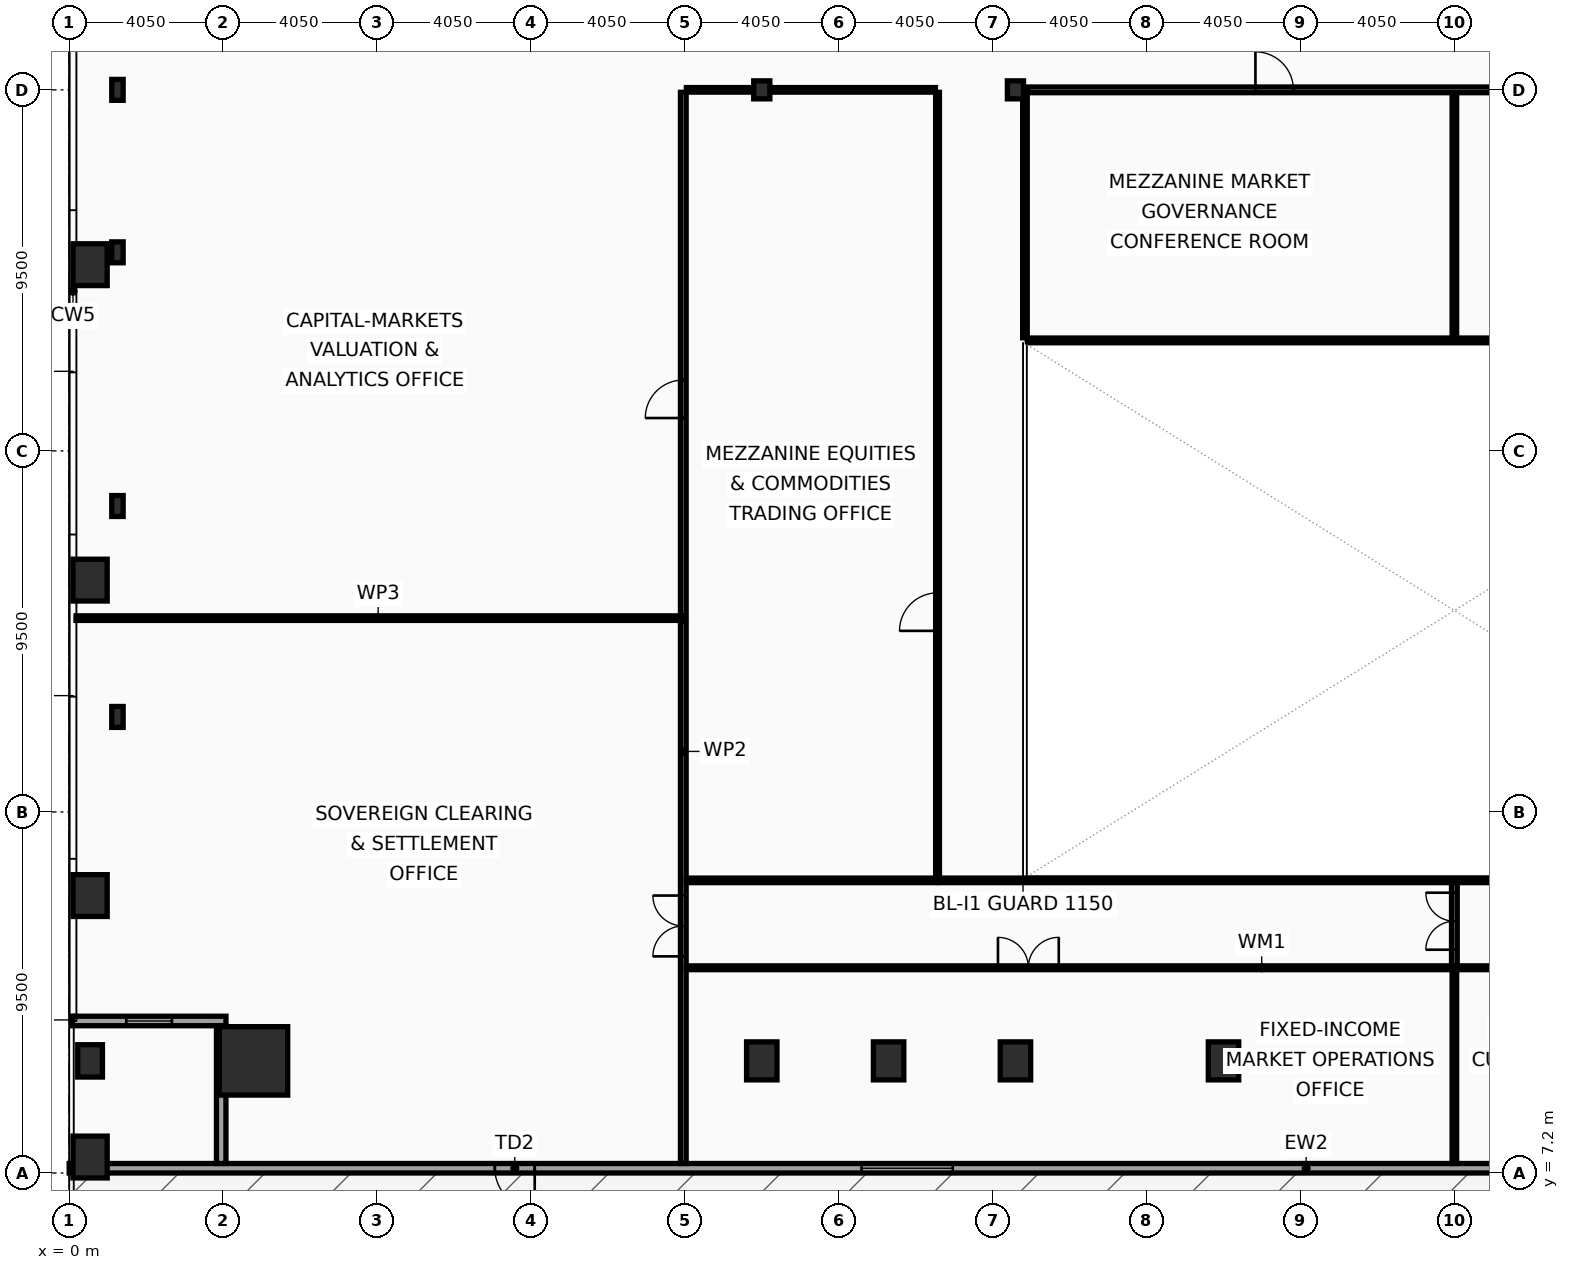
"""IFC4 building model, lengths in metres.
Left out: names, types, materials, properties, quantities, classifications, styles, units other than length and angle.
Written with IfcOpenShell. Run it as: python <this file> out.ifc"""

import sys

from ifc_helpers import new_model, si_unit, direction, frame, frame_2d, origin, origin_2d, place, context, subcontext, project, spatial, rectangle, hollow_rectangle, i_section, extrude, element, fill, save


model = new_model("IFC4")
c1 = context("Model", 3, precision=1e-05, world=origin(), true_north=direction((0.0, 1.0)))
c2 = subcontext(c1, "Body", "Model", "MODEL_VIEW")
j1 = project(units=[si_unit("LENGTHUNIT", "METRE"), si_unit("PLANEANGLEUNIT", "RADIAN")], contexts=[c1])
p1 = place(None, origin())
s1 = spatial("IfcSite", under=j1, at=p1, CompositionType="ELEMENT")
p2 = place(p1, origin())
s2 = spatial("IfcBuilding", under=s1, at=p2, CompositionType="ELEMENT")
p3 = place(p2, frame((0.0, 0.0, 5.4)))
s3 = spatial("IfcBuildingStorey", under=s2, at=p3, CompositionType="ELEMENT", Elevation=5.4)
p4 = place(p3, frame((4.85, 10.15, 0.0), z_axis=(0.0, 0.0, 1.0), x_axis=(1.0, 0.0, 0.0)))
e1 = element("IfcColumn", 1, at=p4, inside=s3, PredefinedType="COLUMN", context=c2, shape_type="SweptSolid", body=[
    extrude(hollow_rectangle(XDim=1.8, YDim=1.8, WallThickness=0.08, at=origin_2d()), origin(), (0.0, 0.0, 1.0), 5.0),
])
for number, where, z_axis, x_axis in (
    (2, (18.225, 10.15, 0.0), (0.0, 0.0, 1.0), (1.0, 0.0, 0.0)),
    (3, (21.562, 10.15, 0.0), (0.0, 0.0, 1.0), (1.0, 0.0, 0.0)),
    (4, (24.9, 10.15, 0.0), (0.0, 0.0, 1.0), (1.0, 0.0, 0.0)),
    (5, (30.375, 10.15, 0.0), (0.0, 0.0, 1.0), (1.0, 0.0, 0.0)),
):
    element("IfcColumn", number, at=place(p3, frame(where, z_axis=z_axis, x_axis=x_axis)), inside=s3, PredefinedType="COLUMN", context=c2, shape_type="SweptSolid", body=[
        extrude(hollow_rectangle(XDim=0.8, YDim=1.0, WallThickness=0.055, at=origin_2d()), origin(), (0.0, 0.0, 1.0), 5.0),
    ])
for number, where, z_axis, x_axis in (
    (6, (1.27, 19.2, 0.0), (0.0, 0.0, 1.0), (1.0, 0.0, 0.0)),
    (7, (1.27, 24.75, 0.0), (0.0, 0.0, 1.0), (1.0, 0.0, 0.0)),
    (8, (1.27, 31.425, 0.0), (0.0, 0.0, 1.0), (1.0, 0.0, 0.0)),
    (9, (1.27, 35.7, 0.0), (0.0, 0.0, 1.0), (1.0, 0.0, 0.0)),
):
    element("IfcColumn", number, at=place(p3, frame(where, z_axis=z_axis, x_axis=x_axis)), inside=s3, PredefinedType="COLUMN", context=c2, shape_type="SweptSolid", body=[
        extrude(i_section(OverallWidth=0.3, OverallDepth=0.55, WebThickness=0.015, FlangeThickness=0.029, at=origin_2d()), origin(), (0.0, 0.0, 1.0), 5.0),
    ])
for number, where, z_axis, x_axis in (
    (10, (18.225, 35.7, 0.0), (0.0, 0.0, 1.0), (1.0, 0.0, 0.0)),
    (11, (24.9, 35.7, 0.0), (0.0, 0.0, 1.0), (1.0, 0.0, 0.0)),
):
    element("IfcColumn", number, at=place(p3, frame(where, z_axis=z_axis, x_axis=x_axis)), inside=s3, PredefinedType="COLUMN", context=c2, shape_type="SweptSolid", body=[
        extrude(i_section(OverallWidth=0.424, OverallDepth=0.474, WebThickness=0.048, FlangeThickness=0.077, at=origin_2d()), origin(), (0.0, 0.0, 1.0), 5.0),
    ])
p5 = place(p3, frame((0.55, 7.62, 0.0), z_axis=(0.0, 0.0, 1.0), x_axis=(1.0, 0.0, 0.0)))
e12 = element("IfcColumn", 12, at=p5, inside=s3, PredefinedType="PILASTER", context=c2, shape_type="SweptSolid", body=[
    extrude(rectangle(XDim=0.9, YDim=1.1, at=origin_2d()), origin(), (0.0, 0.0, 1.0), 5.0),
])
p6 = place(p3, frame((0.55, 10.15, 0.0), z_axis=(0.0, 0.0, 1.0), x_axis=(1.0, 0.0, 0.0)))
e13 = element("IfcColumn", 13, at=p6, inside=s3, PredefinedType="PILASTER", context=c2, shape_type="SweptSolid", body=[
    extrude(rectangle(XDim=0.65, YDim=0.85, at=origin_2d()), origin(), (0.0, 0.0, 1.0), 5.0),
])
for number, where, z_axis, x_axis in (
    (14, (0.55, 14.5, 0.0), (0.0, 0.0, 1.0), (1.0, 0.0, 0.0)),
    (15, (0.55, 22.8, 0.0), (0.0, 0.0, 1.0), (1.0, 0.0, 0.0)),
    (16, (0.55, 31.1, 0.0), (0.0, 0.0, 1.0), (1.0, 0.0, 0.0)),
):
    element("IfcColumn", number, at=place(p3, frame(where, z_axis=z_axis, x_axis=x_axis)), inside=s3, PredefinedType="PILASTER", context=c2, shape_type="SweptSolid", body=[
        extrude(rectangle(XDim=0.9, YDim=1.1, at=origin_2d()), origin(), (0.0, 0.0, 1.0), 5.0),
    ])
p7 = place(p3, frame((72.9, 7.325, 0.0), z_axis=(0.0, 0.0, 1.0), x_axis=(-1.0, 0.0, 0.0)))
e17 = element("IfcWall", 17, at=p7, inside=s3, PredefinedType="SOLIDWALL", context=c2, shape_type="SweptSolid", body=[
    extrude(rectangle(XDim=72.9, YDim=0.25, at=frame_2d((36.45, 0.0))), origin(), (0.0, 0.0, 1.0), 3.89),
])
p8 = place(p7, frame((10.45, 0.0, 0.0)))
e18 = element("IfcOpeningElement", 18, at=p8, cuts=e17, PredefinedType="OPENING", context=c2, shape_type="SweptSolid", body=[
    extrude(rectangle(XDim=1.6, YDim=2.2, at=frame_2d((0.8, 1.1))), frame((0.0, 0.135, 0.0), z_axis=(0.0, -1.0, 0.0), x_axis=(1.0, 0.0, 0.0)), (0.0, 0.0, 1.0), 0.27),
])
p9 = place(p7, frame((29.45, 0.0, 0.0)))
e19 = element("IfcOpeningElement", 19, at=p9, cuts=e17, PredefinedType="OPENING", context=c2, shape_type="SweptSolid", body=[
    extrude(rectangle(XDim=1.6, YDim=2.2, at=frame_2d((0.8, 1.1))), frame((0.0, 0.135, 0.0), z_axis=(0.0, -1.0, 0.0), x_axis=(1.0, 0.0, 0.0)), (0.0, 0.0, 1.0), 0.27),
])
p10 = place(p7, frame((60.65, 0.0, 0.0)))
e20 = element("IfcOpeningElement", 20, at=p10, cuts=e17, PredefinedType="OPENING", context=c2, shape_type="SweptSolid", body=[
    extrude(rectangle(XDim=1.05, YDim=2.15, at=frame_2d((0.525, 1.075))), frame((0.0, 0.135, 0.0), z_axis=(0.0, -1.0, 0.0), x_axis=(1.0, 0.0, 0.0)), (0.0, 0.0, 1.0), 0.27),
])
p11 = place(p7, frame((21.05, 0.0, 0.85)))
e21 = element("IfcOpeningElement", 21, at=p11, cuts=e17, PredefinedType="OPENING", context=c2, shape_type="SweptSolid", body=[
    extrude(rectangle(XDim=2.4, YDim=2.6, at=frame_2d((1.2, 1.3))), frame((0.0, 0.135, 0.0), z_axis=(0.0, -1.0, 0.0), x_axis=(1.0, 0.0, 0.0)), (0.0, 0.0, 1.0), 0.27),
])
p12 = place(p7, frame((49.65, 0.0, 0.85)))
e22 = element("IfcOpeningElement", 22, at=p12, cuts=e17, PredefinedType="OPENING", context=c2, shape_type="SweptSolid", body=[
    extrude(rectangle(XDim=2.4, YDim=2.6, at=frame_2d((1.2, 1.3))), frame((0.0, 0.135, 0.0), z_axis=(0.0, -1.0, 0.0), x_axis=(1.0, 0.0, 0.0)), (0.0, 0.0, 1.0), 0.27),
])
p13 = place(p3, frame((4.125, 11.2, 0.0), z_axis=(0.0, 0.0, 1.0), x_axis=(-1.0, 0.0, 0.0)))
e23 = element("IfcWall", 23, at=p13, inside=s3, PredefinedType="SOLIDWALL", context=c2, shape_type="SweptSolid", body=[
    extrude(rectangle(XDim=4.045, YDim=0.25, at=frame_2d((2.022, 0.0))), origin(), (0.0, 0.0, 1.0), 4.14),
])
p14 = place(p13, frame((1.423, 0.0, 0.9)))
e24 = element("IfcOpeningElement", 24, at=p14, cuts=e23, PredefinedType="OPENING", context=c2, shape_type="SweptSolid", body=[
    extrude(rectangle(XDim=1.2, YDim=2.8, at=frame_2d((0.6, 1.4))), frame((0.0, 0.135, 0.0), z_axis=(0.0, -1.0, 0.0), x_axis=(1.0, 0.0, 0.0)), (0.0, 0.0, 1.0), 0.27),
])
p15 = place(p3, frame((4.0, 7.45, 0.0), z_axis=(0.0, 0.0, 1.0), x_axis=(0.0, 1.0, 0.0)))
e25 = element("IfcWall", 25, at=p15, inside=s3, PredefinedType="SOLIDWALL", context=c2, shape_type="SweptSolid", body=[
    extrude(rectangle(XDim=3.625, YDim=0.25, at=frame_2d((1.812, 0.0))), origin(), (0.0, 0.0, 1.0), 4.14),
])
p16 = place(p3, frame((16.16, 7.45, 0.0), z_axis=(0.0, 0.0, 1.0), x_axis=(0.0, 1.0, 0.0)))
e26 = element("IfcWall", 26, at=p16, inside=s3, PredefinedType="PARTITIONING", context=c2, shape_type="SweptSolid", body=[
    extrude(rectangle(XDim=14.285, YDim=0.15, at=frame_2d((7.143, 0.0))), origin(), (0.0, 0.0, 1.0), 3.89),
])
p17 = place(p16, frame((5.45, 0.0, 0.0)))
e27 = element("IfcOpeningElement", 27, at=p17, cuts=e26, PredefinedType="OPENING", context=c2, shape_type="SweptSolid", body=[
    extrude(rectangle(XDim=1.6, YDim=2.15, at=frame_2d((0.8, 1.075))), frame((0.0, 0.085, 0.0), z_axis=(0.0, -1.0, 0.0), x_axis=(1.0, 0.0, 0.0)), (0.0, 0.0, 1.0), 0.17),
])
p18 = place(p3, frame((16.16, 21.865, 0.0), z_axis=(0.0, 0.0, 1.0), x_axis=(0.0, 1.0, 0.0)))
e28 = element("IfcWall", 28, at=p18, inside=s3, PredefinedType="PARTITIONING", context=c2, shape_type="SweptSolid", body=[
    extrude(rectangle(XDim=13.77, YDim=0.15, at=frame_2d((6.885, 0.0))), origin(), (0.0, 0.0, 1.0), 3.89),
])
p19 = place(p18, frame((5.2, 0.0, 0.0)))
e29 = element("IfcOpeningElement", 29, at=p19, cuts=e28, PredefinedType="OPENING", context=c2, shape_type="SweptSolid", body=[
    extrude(rectangle(XDim=1.0, YDim=2.05, at=frame_2d((0.5, 1.025))), frame((0.0, 0.085, 0.0), z_axis=(0.0, -1.0, 0.0), x_axis=(1.0, 0.0, 0.0)), (0.0, 0.0, 1.0), 0.17),
])
p20 = place(p3, frame((0.18, 21.8, 0.0), z_axis=(0.0, 0.0, 1.0), x_axis=(1.0, 0.0, 0.0)))
e30 = element("IfcWall", 30, at=p20, inside=s3, PredefinedType="PARTITIONING", context=c2, shape_type="SweptSolid", body=[
    extrude(rectangle(XDim=15.9, YDim=0.12, at=frame_2d((7.95, 0.0))), origin(), (0.0, 0.0, 1.0), 4.14),
])
p21 = place(p3, frame((16.24, 12.6, 0.0), z_axis=(0.0, 0.0, 1.0), x_axis=(1.0, 0.0, 0.0)))
e31 = element("IfcWall", 31, at=p21, inside=s3, PredefinedType="MOVABLE", context=c2, shape_type="SweptSolid", body=[
    extrude(rectangle(XDim=20.13, YDim=0.1, at=frame_2d((10.065, 0.0))), origin(), (0.0, 0.0, 1.0), 3.89),
])
p22 = place(p21, frame((8.2, 0.0, 0.0)))
e32 = element("IfcOpeningElement", 32, at=p22, cuts=e31, PredefinedType="OPENING", context=c2, shape_type="SweptSolid", body=[
    extrude(rectangle(XDim=1.6, YDim=2.15, at=frame_2d((0.8, 1.075))), frame((0.0, 0.06, 0.0), z_axis=(0.0, -1.0, 0.0), x_axis=(1.0, 0.0, 0.0)), (0.0, 0.0, 1.0), 0.12),
])
p23 = place(p3, frame((36.53, 12.6, 0.0), z_axis=(0.0, 0.0, 1.0), x_axis=(1.0, 0.0, 0.0)))
e33 = element("IfcWall", 33, at=p23, inside=s3, PredefinedType="MOVABLE", context=c2, shape_type="SweptSolid", body=[
    extrude(rectangle(XDim=20.13, YDim=0.1, at=frame_2d((10.065, 0.0))), origin(), (0.0, 0.0, 1.0), 3.89),
])
p24 = place(p23, frame((8.2, 0.0, 0.0)))
e34 = element("IfcOpeningElement", 34, at=p24, cuts=e33, PredefinedType="OPENING", context=c2, shape_type="SweptSolid", body=[
    extrude(rectangle(XDim=1.6, YDim=2.15, at=frame_2d((0.8, 1.075))), frame((0.0, 0.06, 0.0), z_axis=(0.0, -1.0, 0.0), x_axis=(1.0, 0.0, 0.0)), (0.0, 0.0, 1.0), 0.12),
])
p25 = place(p3, frame((36.45, 7.45, 0.0), z_axis=(0.0, 0.0, 1.0), x_axis=(0.0, 1.0, 0.0)))
e35 = element("IfcWall", 35, at=p25, inside=s3, PredefinedType="PARTITIONING", context=c2, shape_type="SweptSolid", body=[
    extrude(rectangle(XDim=5.095, YDim=0.12, at=frame_2d((2.547, 0.0))), origin(), (0.0, 0.0, 1.0), 4.14),
])
p26 = place(p3, frame((25.215, 29.12, 0.0), z_axis=(0.0, 0.0, 1.0), x_axis=(1.0, 0.0, 0.0)))
e36 = element("IfcWall", 36, at=p26, inside=s3, PredefinedType="MOVABLE", context=c2, shape_type="SweptSolid", body=[
    extrude(rectangle(XDim=22.47, YDim=0.1, at=frame_2d((11.235, 0.0))), origin(), (0.0, 0.0, 1.0), 3.89),
])
p27 = place(p3, frame((36.45, 29.175, 0.0), z_axis=(0.0, 0.0, 1.0), x_axis=(0.0, 1.0, 0.0)))
e37 = element("IfcWall", 37, at=p27, inside=s3, PredefinedType="PARTITIONING", context=c2, shape_type="SweptSolid", body=[
    extrude(rectangle(XDim=6.445, YDim=0.12, at=frame_2d((3.223, 0.0))), origin(), (0.0, 0.0, 1.0), 3.89),
])
p28 = place(p3, frame((25.215, 35.7, 0.0), z_axis=(0.0, 0.0, 1.0), x_axis=(1.0, 0.0, 0.0)))
e38 = element("IfcWall", 38, at=p28, inside=s3, PredefinedType="PARTITIONING", context=c2, shape_type="SweptSolid", body=[
    extrude(rectangle(XDim=22.47, YDim=0.15, at=frame_2d((11.235, 0.0))), origin(), (0.0, 0.0, 1.0), 3.89),
])
p29 = place(p28, frame((6.0, 0.0, 0.0)))
e39 = element("IfcOpeningElement", 39, at=p29, cuts=e38, PredefinedType="OPENING", context=c2, shape_type="SweptSolid", body=[
    extrude(rectangle(XDim=1.0, YDim=2.05, at=frame_2d((0.5, 1.025))), frame((0.0, 0.085, 0.0), z_axis=(0.0, -1.0, 0.0), x_axis=(1.0, 0.0, 0.0)), (0.0, 0.0, 1.0), 0.17),
])
p30 = place(p28, frame((18.5, 0.0, 0.0)))
e40 = element("IfcOpeningElement", 40, at=p30, cuts=e38, PredefinedType="OPENING", context=c2, shape_type="SweptSolid", body=[
    extrude(rectangle(XDim=1.0, YDim=2.05, at=frame_2d((0.5, 1.025))), frame((0.0, 0.085, 0.0), z_axis=(0.0, -1.0, 0.0), x_axis=(1.0, 0.0, 0.0)), (0.0, 0.0, 1.0), 0.17),
])
p31 = place(p3, frame((25.15, 29.175, 0.0), z_axis=(0.0, 0.0, 1.0), x_axis=(0.0, 1.0, 0.0)))
e41 = element("IfcWall", 41, at=p31, inside=s3, PredefinedType="PARTITIONING", context=c2, shape_type="SweptSolid", body=[
    extrude(rectangle(XDim=6.445, YDim=0.12, at=frame_2d((3.223, 0.0))), origin(), (0.0, 0.0, 1.0), 3.89),
])
p32 = place(p3, frame((22.85, 14.965, 0.0), z_axis=(0.0, 0.0, 1.0), x_axis=(0.0, 1.0, 0.0)))
e42 = element("IfcWall", 42, at=p32, inside=s3, PredefinedType="MOVABLE", context=c2, shape_type="SweptSolid", body=[
    extrude(rectangle(XDim=20.67, YDim=0.1, at=frame_2d((10.335, 0.0))), origin(), (0.0, 0.0, 1.0), 4.19),
])
p33 = place(p32, frame((6.5, 0.0, 0.0)))
e43 = element("IfcOpeningElement", 43, at=p33, cuts=e42, PredefinedType="OPENING", context=c2, shape_type="SweptSolid", body=[
    extrude(rectangle(XDim=1.0, YDim=2.05, at=frame_2d((0.5, 1.025))), frame((0.0, 0.06, 0.0), z_axis=(0.0, -1.0, 0.0), x_axis=(1.0, 0.0, 0.0)), (0.0, 0.0, 1.0), 0.12),
])
for number, where, z_axis, x_axis in (
    (44, (16.24, 14.9, 0.0), (0.0, 0.0, 1.0), (1.0, 0.0, 0.0)),
    (45, (16.24, 35.7, 0.0), (0.0, 0.0, 1.0), (1.0, 0.0, 0.0)),
):
    element("IfcWall", number, at=place(p3, frame(where, z_axis=z_axis, x_axis=x_axis)), inside=s3, PredefinedType="PARTITIONING", context=c2, shape_type="SweptSolid", body=[
        extrude(rectangle(XDim=6.555, YDim=0.12, at=frame_2d((3.277, 0.0))), origin(), (0.0, 0.0, 1.0), 3.89),
    ])
p34 = place(p3, frame((36.45, 12.655, 0.0), z_axis=(0.0, 0.0, 1.0), x_axis=(0.0, 1.0, 0.0)))
e46 = element("IfcWall", 46, at=p34, inside=s3, PredefinedType="PARTITIONING", context=c2, shape_type="SweptSolid", body=[
    extrude(rectangle(XDim=2.28, YDim=0.15, at=frame_2d((1.14, 0.0))), origin(), (0.0, 0.0, 1.0), 3.89),
])
p35 = place(p34, frame((0.42, 0.0, 0.0)))
e47 = element("IfcOpeningElement", 47, at=p35, cuts=e46, PredefinedType="OPENING", context=c2, shape_type="SweptSolid", body=[
    extrude(rectangle(XDim=1.5, YDim=2.15, at=frame_2d((0.75, 1.075))), frame((0.0, 0.085, 0.0), z_axis=(0.0, -1.0, 0.0), x_axis=(1.0, 0.0, 0.0)), (0.0, 0.0, 1.0), 0.17),
])
p36 = place(p3, frame((22.905, 14.9, 0.0), z_axis=(0.0, 0.0, 1.0), x_axis=(1.0, 0.0, 0.0)))
e48 = element("IfcWall", 48, at=p36, inside=s3, PredefinedType="PARTITIONING", context=c2, shape_type="SweptSolid", body=[
    extrude(rectangle(XDim=27.09, YDim=0.12, at=frame_2d((13.545, 0.0))), origin(), (0.0, 0.0, 1.0), 3.89),
])
p37 = place(p10, origin())
e49 = element("IfcDoor", 49, at=p37, inside=s3, OperationType="SINGLE_SWING_LEFT", PredefinedType="DOOR", context=c2, shape_type="SweptSolid", body=[
    extrude(rectangle(XDim=1.05, YDim=2.15, at=frame_2d((0.525, 1.075))), frame((0.0, 0.025, 0.0), z_axis=(0.0, -1.0, 0.0), x_axis=(1.0, 0.0, 0.0)), (0.0, 0.0, 1.0), 0.05),
])
fill(e20, e49)
p38 = place(p12, origin())
e50 = element("IfcWindow", 50, at=p38, inside=s3, PartitioningType="SINGLE_PANEL", PredefinedType="WINDOW", context=c2, shape_type="SweptSolid", body=[
    extrude(rectangle(XDim=2.4, YDim=2.6, at=frame_2d((1.2, 1.3))), frame((0.0, 0.03, 0.0), z_axis=(0.0, -1.0, 0.0), x_axis=(1.0, 0.0, 0.0)), (0.0, 0.0, 1.0), 0.06),
])
fill(e22, e50)
p39 = place(p14, origin())
e51 = element("IfcWindow", 51, at=p39, inside=s3, PartitioningType="SINGLE_PANEL", PredefinedType="WINDOW", context=c2, shape_type="SweptSolid", body=[
    extrude(rectangle(XDim=1.2, YDim=2.8, at=frame_2d((0.6, 1.4))), frame((0.0, 0.03, 0.0), z_axis=(0.0, -1.0, 0.0), x_axis=(1.0, 0.0, 0.0)), (0.0, 0.0, 1.0), 0.06),
])
fill(e24, e51)
p40 = place(p17, origin())
e52 = element("IfcDoor", 52, at=p40, inside=s3, OperationType="DOUBLE_DOOR_SINGLE_SWING", PredefinedType="DOOR", context=c2, shape_type="SweptSolid", body=[
    extrude(rectangle(XDim=1.6, YDim=2.15, at=frame_2d((0.8, 1.075))), frame((0.0, 0.025, 0.0), z_axis=(0.0, -1.0, 0.0), x_axis=(1.0, 0.0, 0.0)), (0.0, 0.0, 1.0), 0.05),
])
fill(e27, e52)
p41 = place(p19, origin())
e53 = element("IfcDoor", 53, at=p41, inside=s3, OperationType="SINGLE_SWING_LEFT", PredefinedType="DOOR", context=c2, shape_type="SweptSolid", body=[
    extrude(rectangle(XDim=1.0, YDim=2.05, at=frame_2d((0.5, 1.025))), frame((0.0, 0.025, 0.0), z_axis=(0.0, -1.0, 0.0), x_axis=(1.0, 0.0, 0.0)), (0.0, 0.0, 1.0), 0.05),
])
fill(e29, e53)
p42 = place(p22, origin())
e54 = element("IfcDoor", 54, at=p42, inside=s3, OperationType="DOUBLE_DOOR_SINGLE_SWING", PredefinedType="DOOR", context=c2, shape_type="SweptSolid", body=[
    extrude(rectangle(XDim=1.6, YDim=2.15, at=frame_2d((0.8, 1.075))), frame((0.0, 0.025, 0.0), z_axis=(0.0, -1.0, 0.0), x_axis=(1.0, 0.0, 0.0)), (0.0, 0.0, 1.0), 0.05),
])
fill(e32, e54)
p43 = place(p29, origin())
e55 = element("IfcDoor", 55, at=p43, inside=s3, OperationType="SINGLE_SWING_LEFT", PredefinedType="DOOR", context=c2, shape_type="SweptSolid", body=[
    extrude(rectangle(XDim=1.0, YDim=2.05, at=frame_2d((0.5, 1.025))), frame((0.0, 0.025, 0.0), z_axis=(0.0, -1.0, 0.0), x_axis=(1.0, 0.0, 0.0)), (0.0, 0.0, 1.0), 0.05),
])
fill(e39, e55)
p44 = place(p33, origin())
e56 = element("IfcDoor", 56, at=p44, inside=s3, OperationType="SINGLE_SWING_LEFT", PredefinedType="DOOR", context=c2, shape_type="SweptSolid", body=[
    extrude(rectangle(XDim=1.0, YDim=2.05, at=frame_2d((0.5, 1.025))), frame((0.0, 0.025, 0.0), z_axis=(0.0, -1.0, 0.0), x_axis=(1.0, 0.0, 0.0)), (0.0, 0.0, 1.0), 0.05),
])
fill(e43, e56)
p45 = place(p35, origin())
e57 = element("IfcDoor", 57, at=p45, inside=s3, OperationType="DOUBLE_DOOR_SINGLE_SWING", PredefinedType="DOOR", context=c2, shape_type="SweptSolid", body=[
    extrude(rectangle(XDim=1.5, YDim=2.15, at=frame_2d((0.75, 1.075))), frame((0.0, 0.025, 0.0), z_axis=(0.0, -1.0, 0.0), x_axis=(1.0, 0.0, 0.0)), (0.0, 0.0, 1.0), 0.05),
])
fill(e47, e57)
save(model, sys.argv[1])
